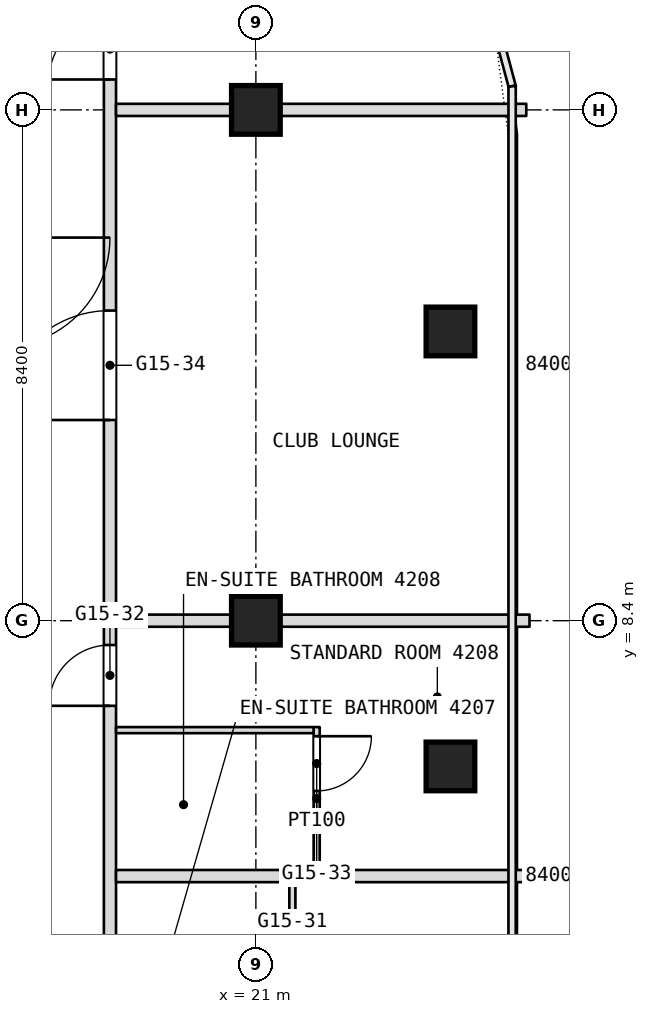
"""IFC4 building model, lengths in metres.
Left out: names, types, materials, properties, quantities, classifications, styles, units other than length and angle.
Written with IfcOpenShell. Run it as: python <this file> out.ifc"""

import sys

from ifc_helpers import new_model, si_unit, direction, frame, frame_2d, origin, origin_2d, place, context, subcontext, project, spatial, rectangle, extrude, element, fill, save


model = new_model("IFC4")
c1 = context("Model", 3, precision=1e-05, world=origin(), true_north=direction((0.0, 1.0)))
c2 = subcontext(c1, "Body", "Model", "MODEL_VIEW")
j1 = project(units=[si_unit("LENGTHUNIT", "METRE"), si_unit("PLANEANGLEUNIT", "RADIAN")], contexts=[c1])
p1 = place(None, origin())
s1 = spatial("IfcSite", under=j1, at=p1, CompositionType="ELEMENT")
p2 = place(p1, origin())
s2 = spatial("IfcBuilding", under=s1, at=p2, CompositionType="ELEMENT")
p3 = place(p2, frame((0.0, 0.0, 187.7)))
s3 = spatial("IfcBuildingStorey", under=s2, at=p3, CompositionType="ELEMENT", Elevation=187.7)
for number, where, z_axis, x_axis in (
    (1, (21.0, 8.4, 0.0), (0.0, 0.0, 1.0), (1.0, 0.0, 0.0)),
    (2, (21.0, 16.8, 0.0), (0.0, 0.0, 1.0), (1.0, 0.0, 0.0)),
    (3, (24.2, 13.156, 0.0), (0.0, 0.0, 1.0), (1.0, 0.0, 0.0)),
    (4, (24.2, 6.003, 0.0), (0.0, 0.0, 1.0), (1.0, 0.0, 0.0)),
):
    element("IfcColumn", number, at=place(p3, frame(where, z_axis=z_axis, x_axis=x_axis)), inside=s3, PredefinedType="COLUMN", context=c2, shape_type="SweptSolid", body=[
        extrude(rectangle(XDim=0.8, YDim=0.8, at=origin_2d()), origin(), (0.0, 0.0, 1.0), 3.6),
    ])
p4 = place(p3, frame((22.0, 4.3, 0.0), z_axis=(0.0, 0.0, 1.0), x_axis=(0.0, 1.0, 0.0)))
e5 = element("IfcWall", 5, at=p4, inside=s3, PredefinedType="PARTITIONING", context=c2, shape_type="SweptSolid", body=[
    extrude(rectangle(XDim=2.35, YDim=0.1, at=frame_2d((1.175, 0.0))), origin(), (0.0, 0.0, 1.0), 3.34),
])
p5 = place(p4, frame((1.3, 0.0, 0.0)))
e6 = element("IfcOpeningElement", 6, at=p5, cuts=e5, PredefinedType="OPENING", context=c2, shape_type="SweptSolid", body=[
    extrude(rectangle(XDim=0.9, YDim=2.1, at=frame_2d((0.45, 1.05))), frame((0.0, 0.05, 0.0), z_axis=(0.0, -1.0, 0.0), x_axis=(1.0, 0.0, 0.0)), (0.0, 0.0, 1.0), 0.1),
])
p6 = place(p3, frame((21.6, 1.85, 0.0), z_axis=(0.0, 0.0, 1.0), x_axis=(0.0, 1.0, 0.0)))
e7 = element("IfcWall", 7, at=p6, inside=s3, PredefinedType="PARTITIONING", context=c2, shape_type="SweptSolid", body=[
    extrude(rectangle(XDim=2.45, YDim=0.1, at=frame_2d((1.225, 0.0))), origin(), (0.0, 0.0, 1.0), 3.34),
])
p7 = place(p6, frame((0.15, 0.0, 0.0)))
e8 = element("IfcOpeningElement", 8, at=p7, cuts=e7, PredefinedType="OPENING", context=c2, shape_type="SweptSolid", body=[
    extrude(rectangle(XDim=0.9, YDim=2.1, at=frame_2d((0.45, 1.05))), frame((0.0, 0.05, 0.0), z_axis=(0.0, -1.0, 0.0), x_axis=(1.0, 0.0, 0.0)), (0.0, 0.0, 1.0), 0.1),
])
p8 = place(p3, frame((18.6, -26.751, 0.0), z_axis=(0.0, 0.0, 1.0), x_axis=(0.0, 1.0, 0.0)))
e9 = element("IfcWall", 9, at=p8, inside=s3, PredefinedType="PARTITIONING", context=c2, shape_type="SweptSolid", body=[
    extrude(rectangle(XDim=49.091, YDim=0.2, at=frame_2d((24.545, 0.0))), origin(), (0.0, 0.0, 1.0), 3.34),
])
p9 = place(p8, frame((3.413, 0.0, 0.0)))
e10 = element("IfcOpeningElement", 10, at=p9, cuts=e9, PredefinedType="OPENING", context=c2, shape_type="SweptSolid", body=[
    extrude(rectangle(XDim=1.0, YDim=2.1, at=frame_2d((0.5, 1.05))), frame((0.0, 0.1, 0.0), z_axis=(0.0, -1.0, 0.0), x_axis=(1.0, 0.0, 0.0)), (0.0, 0.0, 1.0), 0.2),
])
p10 = place(p8, frame((5.838, 0.0, 0.0)))
e11 = element("IfcOpeningElement", 11, at=p10, cuts=e9, PredefinedType="OPENING", context=c2, shape_type="SweptSolid", body=[
    extrude(rectangle(XDim=1.0, YDim=2.1, at=frame_2d((0.5, 1.05))), frame((0.0, 0.1, 0.0), z_axis=(0.0, -1.0, 0.0), x_axis=(1.0, 0.0, 0.0)), (0.0, 0.0, 1.0), 0.2),
])
p11 = place(p8, frame((10.351, 0.0, 0.0)))
e12 = element("IfcOpeningElement", 12, at=p11, cuts=e9, PredefinedType="OPENING", context=c2, shape_type="SweptSolid", body=[
    extrude(rectangle(XDim=1.0, YDim=2.1, at=frame_2d((0.5, 1.05))), frame((0.0, 0.1, 0.0), z_axis=(0.0, -1.0, 0.0), x_axis=(1.0, 0.0, 0.0)), (0.0, 0.0, 1.0), 0.2),
])
p12 = place(p8, frame((16.951, 0.0, 0.0)))
e13 = element("IfcOpeningElement", 13, at=p12, cuts=e9, PredefinedType="OPENING", context=c2, shape_type="SweptSolid", body=[
    extrude(rectangle(XDim=1.0, YDim=2.1, at=frame_2d((0.5, 1.05))), frame((0.0, 0.1, 0.0), z_axis=(0.0, -1.0, 0.0), x_axis=(1.0, 0.0, 0.0)), (0.0, 0.0, 1.0), 0.2),
])
p13 = place(p8, frame((21.151, 0.0, 0.0)))
e14 = element("IfcOpeningElement", 14, at=p13, cuts=e9, PredefinedType="OPENING", context=c2, shape_type="SweptSolid", body=[
    extrude(rectangle(XDim=1.0, YDim=2.1, at=frame_2d((0.5, 1.05))), frame((0.0, 0.1, 0.0), z_axis=(0.0, -1.0, 0.0), x_axis=(1.0, 0.0, 0.0)), (0.0, 0.0, 1.0), 0.2),
])
p14 = place(p8, frame((22.951, 0.0, 0.0)))
e15 = element("IfcOpeningElement", 15, at=p14, cuts=e9, PredefinedType="OPENING", context=c2, shape_type="SweptSolid", body=[
    extrude(rectangle(XDim=1.0, YDim=2.1, at=frame_2d((0.5, 1.05))), frame((0.0, 0.1, 0.0), z_axis=(0.0, -1.0, 0.0), x_axis=(1.0, 0.0, 0.0)), (0.0, 0.0, 1.0), 0.2),
])
p15 = place(p8, frame((27.151, 0.0, 0.0)))
e16 = element("IfcOpeningElement", 16, at=p15, cuts=e9, PredefinedType="OPENING", context=c2, shape_type="SweptSolid", body=[
    extrude(rectangle(XDim=1.0, YDim=2.1, at=frame_2d((0.5, 1.05))), frame((0.0, 0.1, 0.0), z_axis=(0.0, -1.0, 0.0), x_axis=(1.0, 0.0, 0.0)), (0.0, 0.0, 1.0), 0.2),
])
p16 = place(p8, frame((33.751, 0.0, 0.0)))
e17 = element("IfcOpeningElement", 17, at=p16, cuts=e9, PredefinedType="OPENING", context=c2, shape_type="SweptSolid", body=[
    extrude(rectangle(XDim=1.0, YDim=2.1, at=frame_2d((0.5, 1.05))), frame((0.0, 0.1, 0.0), z_axis=(0.0, -1.0, 0.0), x_axis=(1.0, 0.0, 0.0)), (0.0, 0.0, 1.0), 0.2),
])
p17 = place(p8, frame((38.451, 0.0, 0.0)))
e18 = element("IfcOpeningElement", 18, at=p17, cuts=e9, PredefinedType="OPENING", context=c2, shape_type="SweptSolid", body=[
    extrude(rectangle(XDim=1.8, YDim=2.1, at=frame_2d((0.9, 1.05))), frame((0.0, 0.1, 0.0), z_axis=(0.0, -1.0, 0.0), x_axis=(1.0, 0.0, 0.0)), (0.0, 0.0, 1.0), 0.2),
])
p18 = place(p8, frame((44.051, 0.0, 0.0)))
e19 = element("IfcOpeningElement", 19, at=p18, cuts=e9, PredefinedType="OPENING", context=c2, shape_type="SweptSolid", body=[
    extrude(rectangle(XDim=1.0, YDim=2.1, at=frame_2d((0.5, 1.05))), frame((0.0, 0.1, 0.0), z_axis=(0.0, -1.0, 0.0), x_axis=(1.0, 0.0, 0.0)), (0.0, 0.0, 1.0), 0.2),
])
p19 = place(p3, frame((18.7, 4.2, 0.0), z_axis=(0.0, 0.0, 1.0), x_axis=(1.0, 0.0, 0.0)))
e20 = element("IfcWall", 20, at=p19, inside=s3, PredefinedType="PARTITIONING", context=c2, shape_type="SweptSolid", body=[
    extrude(rectangle(XDim=6.8, YDim=0.2, at=frame_2d((3.4, 0.0))), origin(), (0.0, 0.0, 1.0), 3.34),
])
p20 = place(p3, frame((18.7, 6.6, 0.0), z_axis=(0.0, 0.0, 1.0), x_axis=(1.0, 0.0, 0.0)))
e21 = element("IfcWall", 21, at=p20, inside=s3, PredefinedType="PARTITIONING", context=c2, shape_type="SweptSolid", body=[
    extrude(rectangle(XDim=3.25, YDim=0.1, at=frame_2d((1.625, 0.0))), origin(), (0.0, 0.0, 1.0), 3.34),
])
p21 = place(p3, frame((18.7, 8.4, 0.0), z_axis=(0.0, 0.0, 1.0), x_axis=(1.0, 0.0, 0.0)))
e22 = element("IfcWall", 22, at=p21, inside=s3, PredefinedType="PARTITIONING", context=c2, shape_type="SweptSolid", body=[
    extrude(rectangle(XDim=6.8, YDim=0.2, at=frame_2d((3.4, 0.0))), origin(), (0.0, 0.0, 1.0), 2.94),
])
p22 = place(p3, frame((18.7, 16.8, 0.0), z_axis=(0.0, 0.0, 1.0), x_axis=(1.0, 0.0, 0.0)))
e23 = element("IfcWall", 23, at=p22, inside=s3, PredefinedType="PARTITIONING", context=c2, shape_type="SweptSolid", body=[
    extrude(rectangle(XDim=6.747, YDim=0.2, at=frame_2d((3.374, 0.0))), origin(), (0.0, 0.0, 1.0), 2.94),
])
p23 = place(p5, origin())
e24 = element("IfcDoor", 24, at=p23, inside=s3, OperationType="SINGLE_SWING_RIGHT", PredefinedType="DOOR", context=c2, shape_type="SweptSolid", body=[
    extrude(rectangle(XDim=0.9, YDim=2.1, at=frame_2d((0.45, 1.05))), frame((0.0, 0.025, 0.0), z_axis=(0.0, -1.0, 0.0), x_axis=(1.0, 0.0, 0.0)), (0.0, 0.0, 1.0), 0.05),
])
fill(e6, e24)
p24 = place(p16, origin())
e25 = element("IfcDoor", 25, at=p24, inside=s3, OperationType="SINGLE_SWING_RIGHT", PredefinedType="DOOR", context=c2, shape_type="SweptSolid", body=[
    extrude(rectangle(XDim=1.0, YDim=2.1, at=frame_2d((0.5, 1.05))), frame((0.0, 0.025, 0.0), z_axis=(0.0, -1.0, 0.0), x_axis=(1.0, 0.0, 0.0)), (0.0, 0.0, 1.0), 0.05),
])
fill(e17, e25)
p25 = place(p17, origin())
e26 = element("IfcDoor", 26, at=p25, inside=s3, OperationType="DOUBLE_DOOR_SINGLE_SWING", PredefinedType="DOOR", context=c2, shape_type="SweptSolid", body=[
    extrude(rectangle(XDim=1.8, YDim=2.1, at=frame_2d((0.9, 1.05))), frame((0.0, 0.025, 0.0), z_axis=(0.0, -1.0, 0.0), x_axis=(1.0, 0.0, 0.0)), (0.0, 0.0, 1.0), 0.05),
])
fill(e18, e26)
p26 = place(p18, origin())
e27 = element("IfcDoor", 27, at=p26, inside=s3, OperationType="SINGLE_SWING_LEFT", PredefinedType="DOOR", context=c2, shape_type="SweptSolid", body=[
    extrude(rectangle(XDim=1.0, YDim=2.1, at=frame_2d((0.5, 1.05))), frame((0.0, 0.025, 0.0), z_axis=(0.0, -1.0, 0.0), x_axis=(1.0, 0.0, 0.0)), (0.0, 0.0, 1.0), 0.05),
])
fill(e19, e27)
save(model, sys.argv[1])
